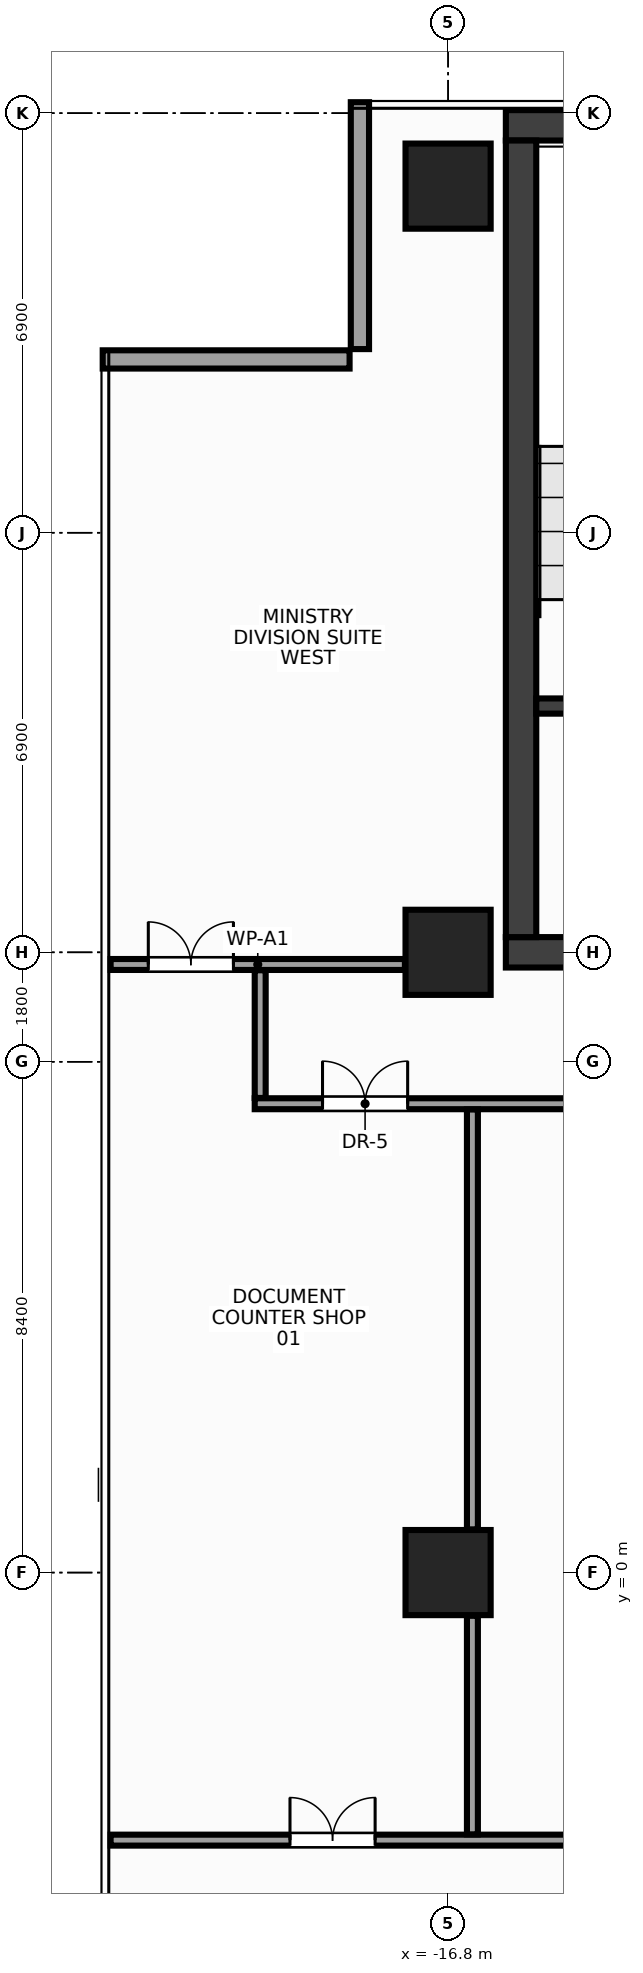
"""IFC4 building model, lengths in metres.
Left out: names, types, materials, properties, quantities, classifications, styles, units other than length and angle.
Written with IfcOpenShell. Run it as: python <this file> out.ifc"""

import sys

from ifc_helpers import new_model, si_unit, direction, frame, frame_2d, origin, origin_2d, place, context, subcontext, project, spatial, rectangle, extrude, source, transform, mapped, element, fill, save


model = new_model("IFC4")
c1 = context("Model", 3, precision=1e-05, world=origin(), true_north=direction((0.0, 1.0)))
c2 = subcontext(c1, "Body", "Model", "MODEL_VIEW")
j1 = project(units=[si_unit("LENGTHUNIT", "METRE"), si_unit("PLANEANGLEUNIT", "RADIAN")], contexts=[c1])
p1 = place(None, origin())
s1 = spatial("IfcSite", under=j1, at=p1, CompositionType="ELEMENT")
p2 = place(p1, origin())
s2 = spatial("IfcBuilding", under=s1, at=p2, CompositionType="ELEMENT")
p3 = place(p2, frame((0.0, 0.0, 268.4)))
s3 = spatial("IfcBuildingStorey", under=s2, at=p3, CompositionType="ELEMENT", Elevation=268.4)
m1 = source(origin(), c2, "Body", "SweptSolid", [
    extrude(rectangle(XDim=31.7, YDim=0.5, at=frame_2d((15.85, 0.0))), origin(), (0.0, 0.0, 1.0), 3.6),
])
p4 = place(p3, frame((-15.85, 23.8, 0.0), z_axis=(0.0, 0.0, 1.0), x_axis=(1.0, 0.0, 0.0)))
e1 = element("IfcWall", 1, at=p4, inside=s3, PredefinedType="SHEAR", context=c2, shape_type="MappedRepresentation", body=[
    mapped(m1, transform((0.0, 0.0, 0.0), x_axis=(1.0, 0.0, 0.0), y_axis=(0.0, 1.0, 0.0), z_axis=(0.0, 0.0, 1.0), scale=1.0)),
])
p5 = place(p3, frame((-15.85, 10.2, 0.0), z_axis=(0.0, 0.0, 1.0), x_axis=(1.0, 0.0, 0.0)))
e2 = element("IfcWall", 2, at=p5, inside=s3, PredefinedType="SHEAR", context=c2, shape_type="MappedRepresentation", body=[
    mapped(m1, transform((0.0, 0.0, 0.0), x_axis=(1.0, 0.0, 0.0), y_axis=(0.0, 1.0, 0.0), z_axis=(0.0, 0.0, 1.0), scale=1.0)),
])
p6 = place(p5, frame((1.7, 0.0, 0.0)))
e3 = element("IfcOpeningElement", 3, at=p6, cuts=e2, PredefinedType="OPENING", context=c2, shape_type="SweptSolid", body=[
    extrude(rectangle(XDim=1.6, YDim=2.15, at=frame_2d((0.8, 1.075))), frame((0.0, 0.262, 0.0), z_axis=(0.0, -1.0, 0.0), x_axis=(1.0, 0.0, 0.0)), (0.0, 0.0, 1.0), 0.524),
])
p7 = place(p5, frame((28.4, 0.0, 0.0)))
e4 = element("IfcOpeningElement", 4, at=p7, cuts=e2, PredefinedType="OPENING", context=c2, shape_type="SweptSolid", body=[
    extrude(rectangle(XDim=1.6, YDim=2.15, at=frame_2d((0.8, 1.075))), frame((0.0, 0.262, 0.0), z_axis=(0.0, -1.0, 0.0), x_axis=(1.0, 0.0, 0.0)), (0.0, 0.0, 1.0), 0.524),
])
p8 = place(p5, frame((15.1, 0.0, 0.0)))
e5 = element("IfcOpeningElement", 5, at=p8, cuts=e2, PredefinedType="OPENING", context=c2, shape_type="SweptSolid", body=[
    extrude(rectangle(XDim=1.5, YDim=2.2, at=frame_2d((0.75, 1.1))), frame((0.0, 0.262, 0.0), z_axis=(0.0, -1.0, 0.0), x_axis=(1.0, 0.0, 0.0)), (0.0, 0.0, 1.0), 0.524),
])
m2 = source(origin(), c2, "Body", "SweptSolid", [
    extrude(rectangle(XDim=13.1, YDim=0.5, at=frame_2d((6.55, 0.0))), origin(), (0.0, 0.0, 1.0), 3.6),
])
p9 = place(p3, frame((-15.6, 10.45, 0.0), z_axis=(0.0, 0.0, 1.0), x_axis=(0.0, 1.0, 0.0)))
e6 = element("IfcWall", 6, at=p9, inside=s3, PredefinedType="SHEAR", context=c2, shape_type="MappedRepresentation", body=[
    mapped(m2, transform((0.0, 0.0, 0.0), x_axis=(1.0, 0.0, 0.0), y_axis=(0.0, 1.0, 0.0), z_axis=(0.0, 0.0, 1.0), scale=1.0)),
])
m3 = source(origin(), c2, "Body", "SweptSolid", [
    extrude(rectangle(XDim=3.705, YDim=0.25, at=frame_2d((1.853, 0.0))), origin(), (0.0, 0.0, 1.0), 3.6),
])
p10 = place(p3, frame((-15.35, 14.25, 0.0), z_axis=(0.0, 0.0, 1.0), x_axis=(1.0, 0.0, 0.0)))
e7 = element("IfcWall", 7, at=p10, inside=s3, PredefinedType="SHEAR", context=c2, shape_type="MappedRepresentation", body=[
    mapped(m3, transform((0.0, 0.0, 0.0), x_axis=(1.0, 0.0, 0.0), y_axis=(0.0, 1.0, 0.0), z_axis=(0.0, 0.0, 1.0), scale=1.0)),
])
p11 = place(p10, frame((0.95, 0.0, 0.0)))
e8 = element("IfcOpeningElement", 8, at=p11, cuts=e7, PredefinedType="OPENING", context=c2, shape_type="SweptSolid", body=[
    extrude(rectangle(XDim=1.6, YDim=2.15, at=frame_2d((0.8, 1.075))), frame((0.0, 0.137, 0.0), z_axis=(0.0, -1.0, 0.0), x_axis=(1.0, 0.0, 0.0)), (0.0, 0.0, 1.0), 0.274),
])
m4 = source(origin(), c2, "Body", "SweptSolid", [
    extrude(rectangle(XDim=1.4, YDim=1.4, at=origin_2d()), origin(), (0.0, 0.0, 1.0), 3.6),
])
for number, where, z_axis, x_axis in (
    (9, (-16.8, 0.0, 0.0), (0.0, 0.0, 1.0), (1.0, 0.0, 0.0)),
    (10, (-16.8, 10.2, 0.0), (0.0, 0.0, 1.0), (1.0, 0.0, 0.0)),
    (11, (-16.8, 22.8, 0.0), (0.0, 0.0, 1.0), (1.0, 0.0, 0.0)),
):
    element("IfcColumn", number, at=place(p3, frame(where, z_axis=z_axis, x_axis=x_axis)), inside=s3, PredefinedType="COLUMN", context=c2, shape_type="MappedRepresentation", body=[
        mapped(m4, transform((0.0, 0.0, 0.0), x_axis=(1.0, 0.0, 0.0), y_axis=(0.0, 1.0, 0.0), z_axis=(0.0, 0.0, 1.0), scale=1.0)),
    ])
m5 = source(origin(), c2, "Body", "SweptSolid", [
    extrude(rectangle(XDim=4.06, YDim=0.3, at=frame_2d((2.03, 0.0))), origin(), (0.0, 0.0, 1.0), 2.75),
])
p12 = place(p3, frame((-18.25, 24.18, 0.0), z_axis=(0.0, 0.0, 1.0), x_axis=(0.0, -1.0, 0.0)))
e12 = element("IfcWall", 12, at=p12, inside=s3, PredefinedType="STANDARD", context=c2, shape_type="MappedRepresentation", body=[
    mapped(m5, transform((0.0, 0.0, 0.0), x_axis=(1.0, 0.0, 0.0), y_axis=(0.0, 1.0, 0.0), z_axis=(0.0, 0.0, 1.0), scale=1.0)),
])
m6 = source(origin(), c2, "Body", "SweptSolid", [
    extrude(rectangle(XDim=4.06, YDim=0.3, at=frame_2d((2.03, 0.0))), origin(), (0.0, 0.0, 1.0), 2.75),
])
p13 = place(p3, frame((-18.42, 19.95, 0.0), z_axis=(0.0, 0.0, 1.0), x_axis=(-1.0, 0.0, 0.0)))
e13 = element("IfcWall", 13, at=p13, inside=s3, PredefinedType="STANDARD", context=c2, shape_type="MappedRepresentation", body=[
    mapped(m6, transform((0.0, 0.0, 0.0), x_axis=(1.0, 0.0, 0.0), y_axis=(0.0, 1.0, 0.0), z_axis=(0.0, 0.0, 1.0), scale=1.0)),
])
m7 = source(origin(), c2, "Body", "SweptSolid", [
    extrude(rectangle(XDim=4.84, YDim=0.18, at=frame_2d((2.42, 0.0))), origin(), (0.0, 0.0, 1.0), 2.805),
])
p14 = place(p3, frame((-22.35, 10.0, 0.0), z_axis=(0.0, 0.0, 1.0), x_axis=(1.0, 0.0, 0.0)))
e14 = element("IfcWall", 14, at=p14, inside=s3, PredefinedType="PARTITIONING", context=c2, shape_type="MappedRepresentation", body=[
    mapped(m7, transform((0.0, 0.0, 0.0), x_axis=(1.0, 0.0, 0.0), y_axis=(0.0, 1.0, 0.0), z_axis=(0.0, 0.0, 1.0), scale=1.0)),
])
p15 = place(p14, frame((0.62, 0.0, 0.0)))
e15 = element("IfcOpeningElement", 15, at=p15, cuts=e14, PredefinedType="OPENING", context=c2, shape_type="SweptSolid", body=[
    extrude(rectangle(XDim=1.4, YDim=2.2, at=frame_2d((0.7, 1.1))), frame((0.0, 0.102, 0.0), z_axis=(0.0, -1.0, 0.0), x_axis=(1.0, 0.0, 0.0)), (0.0, 0.0, 1.0), 0.204),
])
m8 = source(origin(), c2, "Body", "SweptSolid", [
    extrude(rectangle(XDim=15.6, YDim=0.18, at=frame_2d((7.8, 0.0))), origin(), (0.0, 0.0, 1.0), 2.755),
])
p16 = place(p3, frame((-19.98, 7.71, 0.0), z_axis=(0.0, 0.0, 1.0), x_axis=(1.0, 0.0, 0.0)))
e16 = element("IfcWall", 16, at=p16, inside=s3, PredefinedType="PARTITIONING", context=c2, shape_type="MappedRepresentation", body=[
    mapped(m8, transform((0.0, 0.0, 0.0), x_axis=(1.0, 0.0, 0.0), y_axis=(0.0, 1.0, 0.0), z_axis=(0.0, 0.0, 1.0), scale=1.0)),
])
p17 = place(p16, frame((1.115, 0.0, 0.0)))
e17 = element("IfcOpeningElement", 17, at=p17, cuts=e16, PredefinedType="OPENING", context=c2, shape_type="SweptSolid", body=[
    extrude(rectangle(XDim=1.4, YDim=2.2, at=frame_2d((0.7, 1.1))), frame((0.0, 0.102, 0.0), z_axis=(0.0, -1.0, 0.0), x_axis=(1.0, 0.0, 0.0)), (0.0, 0.0, 1.0), 0.204),
])
p18 = place(p16, frame((7.68, 0.0, 0.0)))
e18 = element("IfcOpeningElement", 18, at=p18, cuts=e16, PredefinedType="OPENING", context=c2, shape_type="SweptSolid", body=[
    extrude(rectangle(XDim=1.4, YDim=2.2, at=frame_2d((0.7, 1.1))), frame((0.0, 0.102, 0.0), z_axis=(0.0, -1.0, 0.0), x_axis=(1.0, 0.0, 0.0)), (0.0, 0.0, 1.0), 0.204),
])
m9 = source(origin(), c2, "Body", "SweptSolid", [
    extrude(rectangle(XDim=2.1, YDim=0.18, at=frame_2d((1.05, 0.0))), origin(), (0.0, 0.0, 1.0), 3.37),
])
p19 = place(p3, frame((-19.89, 7.805, 0.0), z_axis=(0.0, 0.0, 1.0), x_axis=(0.0, 1.0, 0.0)))
e19 = element("IfcWall", 19, at=p19, inside=s3, PredefinedType="PARTITIONING", context=c2, shape_type="MappedRepresentation", body=[
    mapped(m9, transform((0.0, 0.0, 0.0), x_axis=(1.0, 0.0, 0.0), y_axis=(0.0, 1.0, 0.0), z_axis=(0.0, 0.0, 1.0), scale=1.0)),
])
m10 = source(origin(), c2, "Body", "SweptSolid", [
    extrude(rectangle(XDim=17.965, YDim=0.18, at=frame_2d((8.982, 0.0))), origin(), (0.0, 0.0, 1.0), 2.755),
])
p20 = place(p3, frame((-22.35, -4.4, 0.0), z_axis=(0.0, 0.0, 1.0), x_axis=(1.0, 0.0, 0.0)))
e20 = element("IfcWall", 20, at=p20, inside=s3, PredefinedType="PARTITIONING", context=c2, shape_type="MappedRepresentation", body=[
    mapped(m10, transform((0.0, 0.0, 0.0), x_axis=(1.0, 0.0, 0.0), y_axis=(0.0, 1.0, 0.0), z_axis=(0.0, 0.0, 1.0), scale=1.0)),
])
p21 = place(p20, frame((2.95, 0.0, 0.0)))
e21 = element("IfcOpeningElement", 21, at=p21, cuts=e20, PredefinedType="OPENING", context=c2, shape_type="SweptSolid", body=[
    extrude(rectangle(XDim=1.4, YDim=2.2, at=frame_2d((0.7, 1.1))), frame((0.0, 0.102, 0.0), z_axis=(0.0, -1.0, 0.0), x_axis=(1.0, 0.0, 0.0)), (0.0, 0.0, 1.0), 0.204),
])
m11 = source(origin(), c2, "Body", "SweptSolid", [
    extrude(rectangle(XDim=3.595, YDim=0.18, at=frame_2d((1.797, 0.0))), origin(), (0.0, 0.0, 1.0), 3.37),
])
p22 = place(p3, frame((-16.4, -4.305, 0.0), z_axis=(0.0, 0.0, 1.0), x_axis=(0.0, 1.0, 0.0)))
e22 = element("IfcWall", 22, at=p22, inside=s3, PredefinedType="PARTITIONING", context=c2, shape_type="MappedRepresentation", body=[
    mapped(m11, transform((0.0, 0.0, 0.0), x_axis=(1.0, 0.0, 0.0), y_axis=(0.0, 1.0, 0.0), z_axis=(0.0, 0.0, 1.0), scale=1.0)),
])
m12 = source(origin(), c2, "Body", "SweptSolid", [
    extrude(rectangle(XDim=6.905, YDim=0.18, at=frame_2d((3.453, 0.0))), origin(), (0.0, 0.0, 1.0), 2.655),
])
p23 = place(p3, frame((-16.4, 0.71, 0.0), z_axis=(0.0, 0.0, 1.0), x_axis=(0.0, 1.0, 0.0)))
e23 = element("IfcWall", 23, at=p23, inside=s3, PredefinedType="PARTITIONING", context=c2, shape_type="MappedRepresentation", body=[
    mapped(m12, transform((0.0, 0.0, 0.0), x_axis=(1.0, 0.0, 0.0), y_axis=(0.0, 1.0, 0.0), z_axis=(0.0, 0.0, 1.0), scale=1.0)),
])
m13 = source(origin(), c2, "Body", "SweptSolid", [
    extrude(rectangle(XDim=1.4, YDim=2.2, at=frame_2d((0.7, 1.1))), frame((0.0, 0.025, 0.0), z_axis=(0.0, -1.0, 0.0), x_axis=(1.0, 0.0, 0.0)), (0.0, 0.0, 1.0), 0.05),
])
p24 = place(p17, origin())
e24 = element("IfcDoor", 24, at=p24, inside=s3, OperationType="DOUBLE_DOOR_SINGLE_SWING", PredefinedType="DOOR", context=c2, shape_type="MappedRepresentation", body=[
    mapped(m13, transform((0.0, 0.0, 0.0), x_axis=(1.0, 0.0, 0.0), y_axis=(0.0, 1.0, 0.0), z_axis=(0.0, 0.0, 1.0), scale=1.0)),
])
fill(e17, e24)
p25 = place(p15, origin())
e25 = element("IfcDoor", 25, at=p25, inside=s3, OperationType="DOUBLE_DOOR_SINGLE_SWING", PredefinedType="DOOR", context=c2, shape_type="MappedRepresentation", body=[
    mapped(m13, transform((0.0, 0.0, 0.0), x_axis=(1.0, 0.0, 0.0), y_axis=(0.0, 1.0, 0.0), z_axis=(0.0, 0.0, 1.0), scale=1.0)),
])
fill(e15, e25)
p26 = place(p21, origin())
e26 = element("IfcDoor", 26, at=p26, inside=s3, OperationType="DOUBLE_DOOR_SINGLE_SWING", PredefinedType="DOOR", context=c2, shape_type="MappedRepresentation", body=[
    mapped(m13, transform((0.0, 0.0, 0.0), x_axis=(1.0, 0.0, 0.0), y_axis=(0.0, 1.0, 0.0), z_axis=(0.0, 0.0, 1.0), scale=1.0)),
])
fill(e21, e26)
save(model, sys.argv[1])
